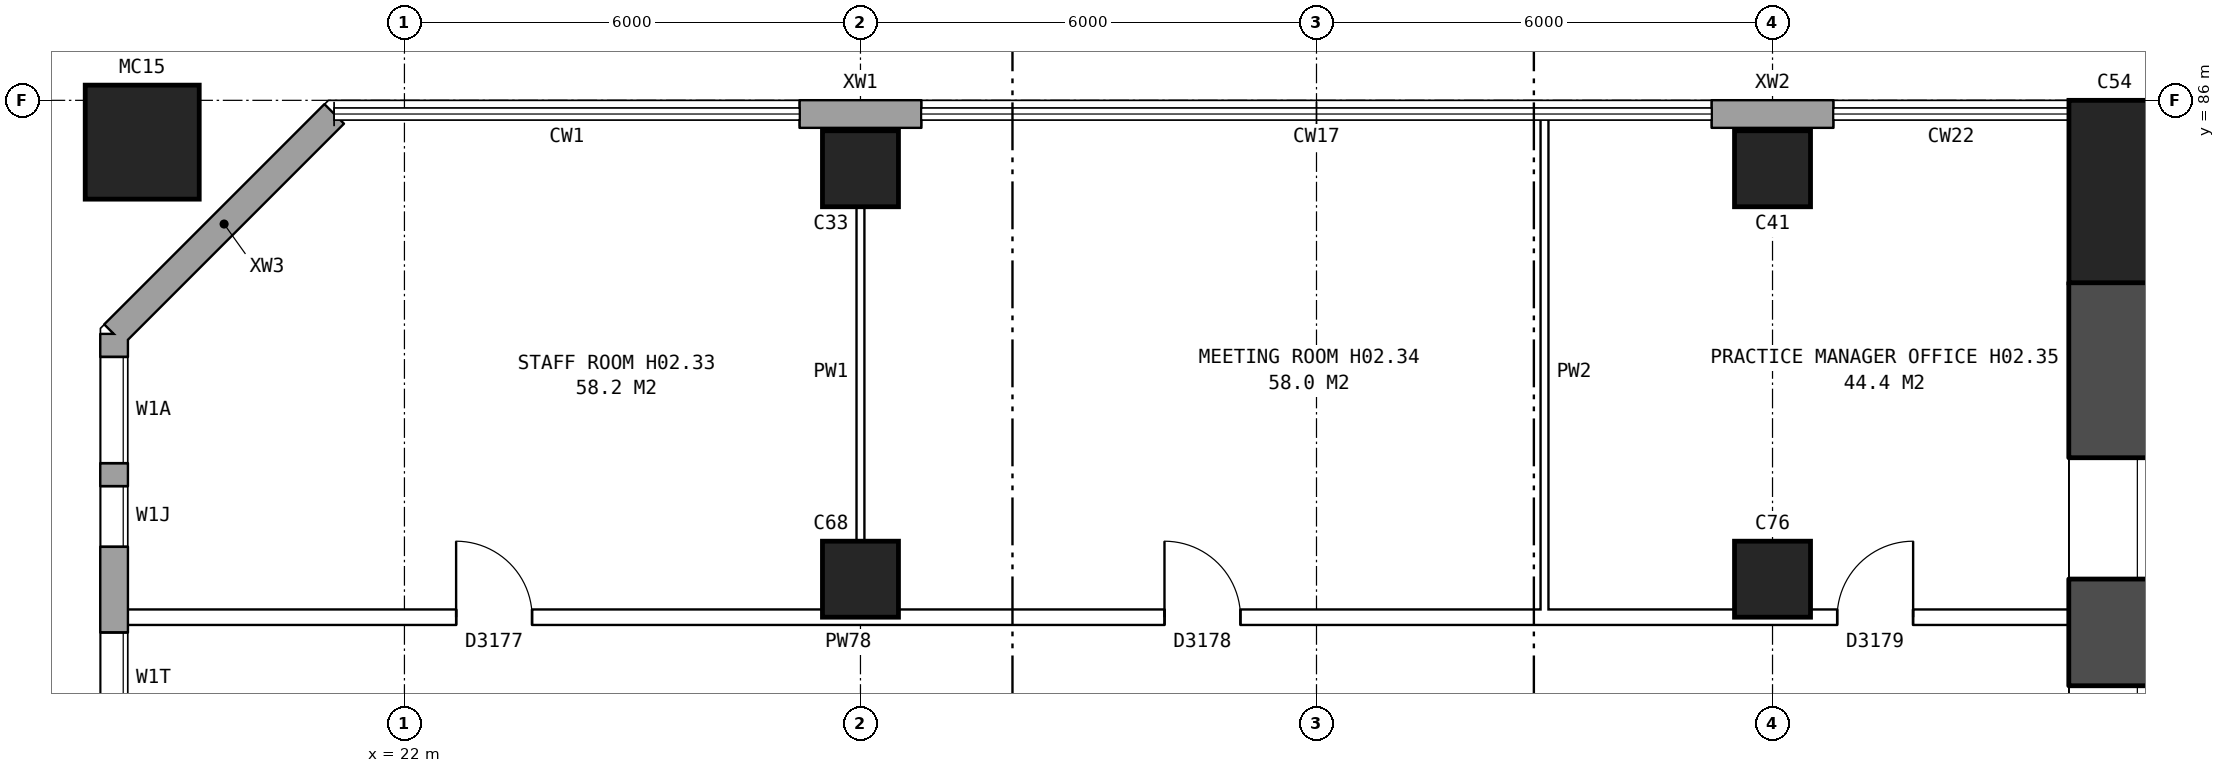
"""IFC4 building model, lengths in metres.
Left out: names, types, materials, properties, quantities, classifications, styles, units other than length and angle.
Written with IfcOpenShell. Run it as: python <this file> out.ifc"""

import sys

from ifc_helpers import new_model, si_unit, direction, frame, frame_2d, origin, origin_2d, place, context, subcontext, project, spatial, rectangle, hollow_rectangle, extrude, element, fill, save


model = new_model("IFC4")
c1 = context("Model", 3, precision=1e-05, world=origin(), true_north=direction((0.0, 1.0)))
c2 = subcontext(c1, "Body", "Model", "MODEL_VIEW")
j1 = project(units=[si_unit("LENGTHUNIT", "METRE"), si_unit("PLANEANGLEUNIT", "RADIAN")], contexts=[c1])
p1 = place(None, origin())
s1 = spatial("IfcSite", under=j1, at=p1, CompositionType="ELEMENT")
p2 = place(p1, origin())
s2 = spatial("IfcBuilding", under=s1, at=p2, CompositionType="ELEMENT")
p3 = place(p2, frame((0.0, 0.0, 10.1)))
s3 = spatial("IfcBuildingStorey", under=s2, at=p3, CompositionType="ELEMENT", Elevation=10.1)
p4 = place(p3, frame((44.5, 84.8, -0.3), z_axis=(0.0, 0.0, 1.0), x_axis=(1.0, 0.0, 0.0)))
e1 = element("IfcColumn", 1, at=p4, inside=s3, PredefinedType="COLUMN", context=c2, shape_type="SweptSolid", body=[
    extrude(rectangle(XDim=1.2, YDim=2.4, at=origin_2d()), origin(), (0.0, 0.0, 1.0), 4.4),
])
p5 = place(p3, frame((44.5, 56.4, -0.3), z_axis=(0.0, 0.0, 1.0), x_axis=(0.0, 1.0, 0.0)))
e2 = element("IfcWall", 2, at=p5, inside=s3, PredefinedType="SHEAR", context=c2, shape_type="SweptSolid", body=[
    extrude(rectangle(XDim=27.2, YDim=1.2, at=frame_2d((13.6, 0.0))), origin(), (0.0, 0.0, 1.0), 4.4),
])
p6 = place(p5, frame((2.3, 0.0, 0.8)))
e3 = element("IfcOpeningElement", 3, at=p6, cuts=e2, PredefinedType="OPENING", context=c2, shape_type="SweptSolid", body=[
    extrude(rectangle(XDim=1.6, YDim=1.8, at=frame_2d((0.8, 0.9))), frame((0.0, 0.61, 0.0), z_axis=(0.0, -1.0, 0.0), x_axis=(1.0, 0.0, 0.0)), (0.0, 0.0, 1.0), 1.22),
])
p7 = place(p5, frame((5.3, 0.0, 0.8)))
e4 = element("IfcOpeningElement", 4, at=p7, cuts=e2, PredefinedType="OPENING", context=c2, shape_type="SweptSolid", body=[
    extrude(rectangle(XDim=1.6, YDim=1.8, at=frame_2d((0.8, 0.9))), frame((0.0, 0.61, 0.0), z_axis=(0.0, -1.0, 0.0), x_axis=(1.0, 0.0, 0.0)), (0.0, 0.0, 1.0), 1.22),
])
p8 = place(p5, frame((8.3, 0.0, 0.8)))
e5 = element("IfcOpeningElement", 5, at=p8, cuts=e2, PredefinedType="OPENING", context=c2, shape_type="SweptSolid", body=[
    extrude(rectangle(XDim=1.6, YDim=1.8, at=frame_2d((0.8, 0.9))), frame((0.0, 0.61, 0.0), z_axis=(0.0, -1.0, 0.0), x_axis=(1.0, 0.0, 0.0)), (0.0, 0.0, 1.0), 1.22),
])
p9 = place(p5, frame((11.3, 0.0, 0.8)))
e6 = element("IfcOpeningElement", 6, at=p9, cuts=e2, PredefinedType="OPENING", context=c2, shape_type="SweptSolid", body=[
    extrude(rectangle(XDim=1.6, YDim=1.8, at=frame_2d((0.8, 0.9))), frame((0.0, 0.61, 0.0), z_axis=(0.0, -1.0, 0.0), x_axis=(1.0, 0.0, 0.0)), (0.0, 0.0, 1.0), 1.22),
])
p10 = place(p5, frame((14.3, 0.0, 0.8)))
e7 = element("IfcOpeningElement", 7, at=p10, cuts=e2, PredefinedType="OPENING", context=c2, shape_type="SweptSolid", body=[
    extrude(rectangle(XDim=1.6, YDim=1.8, at=frame_2d((0.8, 0.9))), frame((0.0, 0.61, 0.0), z_axis=(0.0, -1.0, 0.0), x_axis=(1.0, 0.0, 0.0)), (0.0, 0.0, 1.0), 1.22),
])
p11 = place(p5, frame((17.3, 0.0, 0.8)))
e8 = element("IfcOpeningElement", 8, at=p11, cuts=e2, PredefinedType="OPENING", context=c2, shape_type="SweptSolid", body=[
    extrude(rectangle(XDim=1.6, YDim=1.8, at=frame_2d((0.8, 0.9))), frame((0.0, 0.61, 0.0), z_axis=(0.0, -1.0, 0.0), x_axis=(1.0, 0.0, 0.0)), (0.0, 0.0, 1.0), 1.22),
])
p12 = place(p5, frame((20.3, 0.0, 0.8)))
e9 = element("IfcOpeningElement", 9, at=p12, cuts=e2, PredefinedType="OPENING", context=c2, shape_type="SweptSolid", body=[
    extrude(rectangle(XDim=1.6, YDim=1.8, at=frame_2d((0.8, 0.9))), frame((0.0, 0.61, 0.0), z_axis=(0.0, -1.0, 0.0), x_axis=(1.0, 0.0, 0.0)), (0.0, 0.0, 1.0), 1.22),
])
p13 = place(p5, frame((23.3, 0.0, 0.8)))
e10 = element("IfcOpeningElement", 10, at=p13, cuts=e2, PredefinedType="OPENING", context=c2, shape_type="SweptSolid", body=[
    extrude(rectangle(XDim=1.6, YDim=1.8, at=frame_2d((0.8, 0.9))), frame((0.0, 0.61, 0.0), z_axis=(0.0, -1.0, 0.0), x_axis=(1.0, 0.0, 0.0)), (0.0, 0.0, 1.0), 1.22),
])
for number, where, z_axis, x_axis in (
    (11, (28.0, 79.7, 0.0), (0.0, 0.0, 1.0), (1.0, 0.0, 0.0)),
    (12, (28.0, 85.1, 0.0), (0.0, 0.0, 1.0), (1.0, 0.0, 0.0)),
    (13, (40.0, 79.7, 0.0), (0.0, 0.0, 1.0), (1.0, 0.0, 0.0)),
    (14, (40.0, 85.1, 0.0), (0.0, 0.0, 1.0), (1.0, 0.0, 0.0)),
):
    element("IfcColumn", number, at=place(p3, frame(where, z_axis=z_axis, x_axis=x_axis)), inside=s3, PredefinedType="COLUMN", context=c2, shape_type="SweptSolid", body=[
        extrude(rectangle(XDim=1.0, YDim=1.0, at=origin_2d()), origin(), (0.0, 0.0, 1.0), 4.3),
    ])
p14 = place(p3, frame((18.55, 85.45, 0.0), z_axis=(0.0, 0.0, 1.0), x_axis=(1.0, 0.0, 0.0)))
e15 = element("IfcColumn", 15, at=p14, inside=s3, PredefinedType="COLUMN", context=c2, shape_type="SweptSolid", body=[
    extrude(hollow_rectangle(XDim=1.5, YDim=1.5, WallThickness=0.08, at=origin_2d()), origin(), (0.0, 0.0, 1.0), 4.6),
])
for number, where, z_axis, x_axis in (
    (16, (40.8, 85.82, 0.0), (0.0, 0.0, 1.0), (-1.0, 0.0, 0.0)),
    (17, (28.8, 85.82, 0.0), (0.0, 0.0, 1.0), (-1.0, 0.0, 0.0)),
):
    element("IfcWall", number, at=place(p3, frame(where, z_axis=z_axis, x_axis=x_axis)), inside=s3, PredefinedType="STANDARD", context=c2, shape_type="SweptSolid", body=[
        extrude(rectangle(XDim=1.6, YDim=0.36, at=frame_2d((0.8, 0.0))), origin(), (0.0, 0.0, 1.0), 4.3),
    ])
p15 = place(p3, frame((21.075, 85.82, 0.0), z_axis=(0.0, 0.0, 1.0), x_axis=(-0.707106781187, -0.707106781187, 0.0)))
e18 = element("IfcWall", 18, at=p15, inside=s3, PredefinedType="STANDARD", context=c2, shape_type="SweptSolid", body=[
    extrude(rectangle(XDim=4.094, YDim=0.36, at=frame_2d((2.047, 0.0))), origin(), (0.0, 0.0, 1.0), 4.3),
])
p16 = place(p3, frame((18.18, 82.925, 0.0), z_axis=(0.0, 0.0, 1.0), x_axis=(0.0, -1.0, 0.0)))
e19 = element("IfcWall", 19, at=p16, inside=s3, PredefinedType="STANDARD", context=c2, shape_type="SweptSolid", body=[
    extrude(rectangle(XDim=25.851, YDim=0.36, at=frame_2d((12.925, 0.0))), origin(), (0.0, 0.0, 1.0), 4.3),
])
p17 = place(p16, frame((0.3, 0.0, 0.8)))
e20 = element("IfcOpeningElement", 20, at=p17, cuts=e19, PredefinedType="OPENING", context=c2, shape_type="SweptSolid", body=[
    extrude(rectangle(XDim=1.4, YDim=1.8, at=frame_2d((0.7, 0.9))), frame((0.0, 0.19, 0.0), z_axis=(0.0, -1.0, 0.0), x_axis=(1.0, 0.0, 0.0)), (0.0, 0.0, 1.0), 0.38),
])
p18 = place(p16, frame((3.925, 0.0, 0.8)))
e21 = element("IfcOpeningElement", 21, at=p18, cuts=e19, PredefinedType="OPENING", context=c2, shape_type="SweptSolid", body=[
    extrude(rectangle(XDim=1.2, YDim=0.9, at=frame_2d((0.6, 0.45))), frame((0.0, 0.19, 0.0), z_axis=(0.0, -1.0, 0.0), x_axis=(1.0, 0.0, 0.0)), (0.0, 0.0, 1.0), 0.38),
])
p19 = place(p16, frame((7.375, 0.0, 1.7)))
e22 = element("IfcOpeningElement", 22, at=p19, cuts=e19, PredefinedType="OPENING", context=c2, shape_type="SweptSolid", body=[
    extrude(rectangle(XDim=1.0, YDim=0.9, at=frame_2d((0.5, 0.45))), frame((0.0, 0.19, 0.0), z_axis=(0.0, -1.0, 0.0), x_axis=(1.0, 0.0, 0.0)), (0.0, 0.0, 1.0), 0.38),
])
p20 = place(p16, frame((10.625, 0.0, 0.8)))
e23 = element("IfcOpeningElement", 23, at=p20, cuts=e19, PredefinedType="OPENING", context=c2, shape_type="SweptSolid", body=[
    extrude(rectangle(XDim=1.6, YDim=1.8, at=frame_2d((0.8, 0.9))), frame((0.0, 0.19, 0.0), z_axis=(0.0, -1.0, 0.0), x_axis=(1.0, 0.0, 0.0)), (0.0, 0.0, 1.0), 0.38),
])
p21 = place(p16, frame((13.625, 0.0, 0.8)))
e24 = element("IfcOpeningElement", 24, at=p21, cuts=e19, PredefinedType="OPENING", context=c2, shape_type="SweptSolid", body=[
    extrude(rectangle(XDim=1.6, YDim=1.8, at=frame_2d((0.8, 0.9))), frame((0.0, 0.19, 0.0), z_axis=(0.0, -1.0, 0.0), x_axis=(1.0, 0.0, 0.0)), (0.0, 0.0, 1.0), 0.38),
])
p22 = place(p16, frame((15.525, 0.0, 1.4)))
e25 = element("IfcOpeningElement", 25, at=p22, cuts=e19, PredefinedType="OPENING", context=c2, shape_type="SweptSolid", body=[
    extrude(rectangle(XDim=1.6, YDim=1.2, at=frame_2d((0.8, 0.6))), frame((0.0, 0.19, 0.0), z_axis=(0.0, -1.0, 0.0), x_axis=(1.0, 0.0, 0.0)), (0.0, 0.0, 1.0), 0.38),
])
p23 = place(p16, frame((20.725, 0.0, 0.8)))
e26 = element("IfcOpeningElement", 26, at=p23, cuts=e19, PredefinedType="OPENING", context=c2, shape_type="SweptSolid", body=[
    extrude(rectangle(XDim=1.2, YDim=0.9, at=frame_2d((0.6, 0.45))), frame((0.0, 0.19, 0.0), z_axis=(0.0, -1.0, 0.0), x_axis=(1.0, 0.0, 0.0)), (0.0, 0.0, 1.0), 0.38),
])
p24 = place(p16, frame((22.325, 0.0, 0.8)))
e27 = element("IfcOpeningElement", 27, at=p24, cuts=e19, PredefinedType="OPENING", context=c2, shape_type="SweptSolid", body=[
    extrude(rectangle(XDim=1.6, YDim=1.2, at=frame_2d((0.8, 0.6))), frame((0.0, 0.19, 0.0), z_axis=(0.0, -1.0, 0.0), x_axis=(1.0, 0.0, 0.0)), (0.0, 0.0, 1.0), 0.38),
])
p25 = place(p16, frame((2.0, 0.0, 0.8)))
e28 = element("IfcOpeningElement", 28, at=p25, cuts=e19, PredefinedType="OPENING", context=c2, shape_type="SweptSolid", body=[
    extrude(rectangle(XDim=0.8, YDim=1.5, at=frame_2d((0.4, 0.75))), frame((0.0, 0.19, 0.0), z_axis=(0.0, -1.0, 0.0), x_axis=(1.0, 0.0, 0.0)), (0.0, 0.0, 1.0), 0.38),
])
p26 = place(p16, frame((8.675, 0.0, 1.4)))
e29 = element("IfcOpeningElement", 29, at=p26, cuts=e19, PredefinedType="OPENING", context=c2, shape_type="SweptSolid", body=[
    extrude(rectangle(XDim=1.6, YDim=1.2, at=frame_2d((0.8, 0.6))), frame((0.0, 0.19, 0.0), z_axis=(0.0, -1.0, 0.0), x_axis=(1.0, 0.0, 0.0)), (0.0, 0.0, 1.0), 0.38),
])
p27 = place(p16, frame((17.425, 0.0, 1.7)))
e30 = element("IfcOpeningElement", 30, at=p27, cuts=e19, PredefinedType="OPENING", context=c2, shape_type="SweptSolid", body=[
    extrude(rectangle(XDim=1.0, YDim=0.9, at=frame_2d((0.5, 0.45))), frame((0.0, 0.19, 0.0), z_axis=(0.0, -1.0, 0.0), x_axis=(1.0, 0.0, 0.0)), (0.0, 0.0, 1.0), 0.38),
])
p28 = place(p16, frame((24.225, 0.0, 0.8)))
e31 = element("IfcOpeningElement", 31, at=p28, cuts=e19, PredefinedType="OPENING", context=c2, shape_type="SweptSolid", body=[
    extrude(rectangle(XDim=1.0, YDim=1.8, at=frame_2d((0.5, 0.9))), frame((0.0, 0.19, 0.0), z_axis=(0.0, -1.0, 0.0), x_axis=(1.0, 0.0, 0.0)), (0.0, 0.0, 1.0), 0.38),
])
p29 = place(p3, frame((18.24, 79.2, 0.0), z_axis=(0.0, 0.0, 1.0), x_axis=(1.0, 0.0, 0.0)))
e32 = element("IfcWall", 32, at=p29, inside=s3, PredefinedType="PARTITIONING", context=c2, shape_type="SweptSolid", body=[
    extrude(rectangle(XDim=25.78, YDim=0.2, at=frame_2d((12.89, 0.0))), origin(), (0.0, 0.0, 1.0), 4.3),
])
p30 = place(p29, frame((4.44, 0.0, 0.0)))
e33 = element("IfcOpeningElement", 33, at=p30, cuts=e32, PredefinedType="OPENING", context=c2, shape_type="SweptSolid", body=[
    extrude(rectangle(XDim=1.0, YDim=2.1, at=frame_2d((0.5, 1.05))), frame((0.0, 0.11, 0.0), z_axis=(0.0, -1.0, 0.0), x_axis=(1.0, 0.0, 0.0)), (0.0, 0.0, 1.0), 0.22),
])
p31 = place(p29, frame((13.76, 0.0, 0.0)))
e34 = element("IfcOpeningElement", 34, at=p31, cuts=e32, PredefinedType="OPENING", context=c2, shape_type="SweptSolid", body=[
    extrude(rectangle(XDim=1.0, YDim=2.1, at=frame_2d((0.5, 1.05))), frame((0.0, 0.11, 0.0), z_axis=(0.0, -1.0, 0.0), x_axis=(1.0, 0.0, 0.0)), (0.0, 0.0, 1.0), 0.22),
])
p32 = place(p29, frame((22.61, 0.0, 0.0)))
e35 = element("IfcOpeningElement", 35, at=p32, cuts=e32, PredefinedType="OPENING", context=c2, shape_type="SweptSolid", body=[
    extrude(rectangle(XDim=1.0, YDim=2.1, at=frame_2d((0.5, 1.05))), frame((0.0, 0.11, 0.0), z_axis=(0.0, -1.0, 0.0), x_axis=(1.0, 0.0, 0.0)), (0.0, 0.0, 1.0), 0.22),
])
for number, where, z_axis, x_axis in (
    (36, (28.0, 79.1, 0.0), (0.0, 0.0, 1.0), (0.0, 1.0, 0.0)),
    (37, (37.0, 79.1, 0.0), (0.0, 0.0, 1.0), (0.0, 1.0, 0.0)),
):
    element("IfcWall", number, at=place(p3, frame(where, z_axis=z_axis, x_axis=x_axis)), inside=s3, PredefinedType="PARTITIONING", context=c2, shape_type="SweptSolid", body=[
        extrude(rectangle(XDim=6.66, YDim=0.1, at=frame_2d((3.33, 0.0))), origin(), (0.0, 0.0, 1.0), 4.3),
    ])
p33 = place(p17, origin())
e38 = element("IfcWindow", 38, at=p33, inside=s3, PartitioningType="SINGLE_PANEL", PredefinedType="WINDOW", context=c2, shape_type="SweptSolid", body=[
    extrude(rectangle(XDim=1.4, YDim=1.8, at=frame_2d((0.7, 0.9))), frame((0.0, 0.15, 0.0), z_axis=(0.0, -1.0, 0.0), x_axis=(1.0, 0.0, 0.0)), (0.0, 0.0, 1.0), 0.06),
])
fill(e20, e38)
p34 = place(p18, origin())
e39 = element("IfcWindow", 39, at=p34, inside=s3, PartitioningType="SINGLE_PANEL", PredefinedType="WINDOW", context=c2, shape_type="SweptSolid", body=[
    extrude(rectangle(XDim=1.2, YDim=0.9, at=frame_2d((0.6, 0.45))), frame((0.0, 0.15, 0.0), z_axis=(0.0, -1.0, 0.0), x_axis=(1.0, 0.0, 0.0)), (0.0, 0.0, 1.0), 0.06),
])
fill(e21, e39)
p35 = place(p12, origin())
e40 = element("IfcWindow", 40, at=p35, inside=s3, PartitioningType="SINGLE_PANEL", PredefinedType="WINDOW", context=c2, shape_type="SweptSolid", body=[
    extrude(rectangle(XDim=1.6, YDim=1.8, at=frame_2d((0.8, 0.9))), frame((0.0, -0.27, 0.0), z_axis=(0.0, -1.0, 0.0), x_axis=(1.0, 0.0, 0.0)), (0.0, 0.0, 1.0), 0.06),
])
fill(e9, e40)
p36 = place(p13, origin())
e41 = element("IfcWindow", 41, at=p36, inside=s3, PartitioningType="SINGLE_PANEL", PredefinedType="WINDOW", context=c2, shape_type="SweptSolid", body=[
    extrude(rectangle(XDim=1.6, YDim=1.8, at=frame_2d((0.8, 0.9))), frame((0.0, -0.27, 0.0), z_axis=(0.0, -1.0, 0.0), x_axis=(1.0, 0.0, 0.0)), (0.0, 0.0, 1.0), 0.06),
])
fill(e10, e41)
p37 = place(p30, origin())
e42 = element("IfcDoor", 42, at=p37, inside=s3, OperationType="SINGLE_SWING_LEFT", PredefinedType="DOOR", context=c2, shape_type="SweptSolid", body=[
    extrude(rectangle(XDim=1.0, YDim=2.1, at=frame_2d((0.5, 1.05))), frame((0.0, 0.025, 0.0), z_axis=(0.0, -1.0, 0.0), x_axis=(1.0, 0.0, 0.0)), (0.0, 0.0, 1.0), 0.05),
])
fill(e33, e42)
p38 = place(p31, origin())
e43 = element("IfcDoor", 43, at=p38, inside=s3, OperationType="SINGLE_SWING_LEFT", PredefinedType="DOOR", context=c2, shape_type="SweptSolid", body=[
    extrude(rectangle(XDim=1.0, YDim=2.1, at=frame_2d((0.5, 1.05))), frame((0.0, 0.025, 0.0), z_axis=(0.0, -1.0, 0.0), x_axis=(1.0, 0.0, 0.0)), (0.0, 0.0, 1.0), 0.05),
])
fill(e34, e43)
p39 = place(p32, origin())
e44 = element("IfcDoor", 44, at=p39, inside=s3, OperationType="SINGLE_SWING_RIGHT", PredefinedType="DOOR", context=c2, shape_type="SweptSolid", body=[
    extrude(rectangle(XDim=1.0, YDim=2.1, at=frame_2d((0.5, 1.05))), frame((0.0, 0.025, 0.0), z_axis=(0.0, -1.0, 0.0), x_axis=(1.0, 0.0, 0.0)), (0.0, 0.0, 1.0), 0.05),
])
fill(e35, e44)
p40 = place(p25, origin())
e45 = element("IfcWindow", 45, at=p40, inside=s3, PartitioningType="SINGLE_PANEL", PredefinedType="WINDOW", context=c2, shape_type="SweptSolid", body=[
    extrude(rectangle(XDim=0.8, YDim=1.5, at=frame_2d((0.4, 0.75))), frame((0.0, 0.15, 0.0), z_axis=(0.0, -1.0, 0.0), x_axis=(1.0, 0.0, 0.0)), (0.0, 0.0, 1.0), 0.06),
])
fill(e28, e45)
save(model, sys.argv[1])
